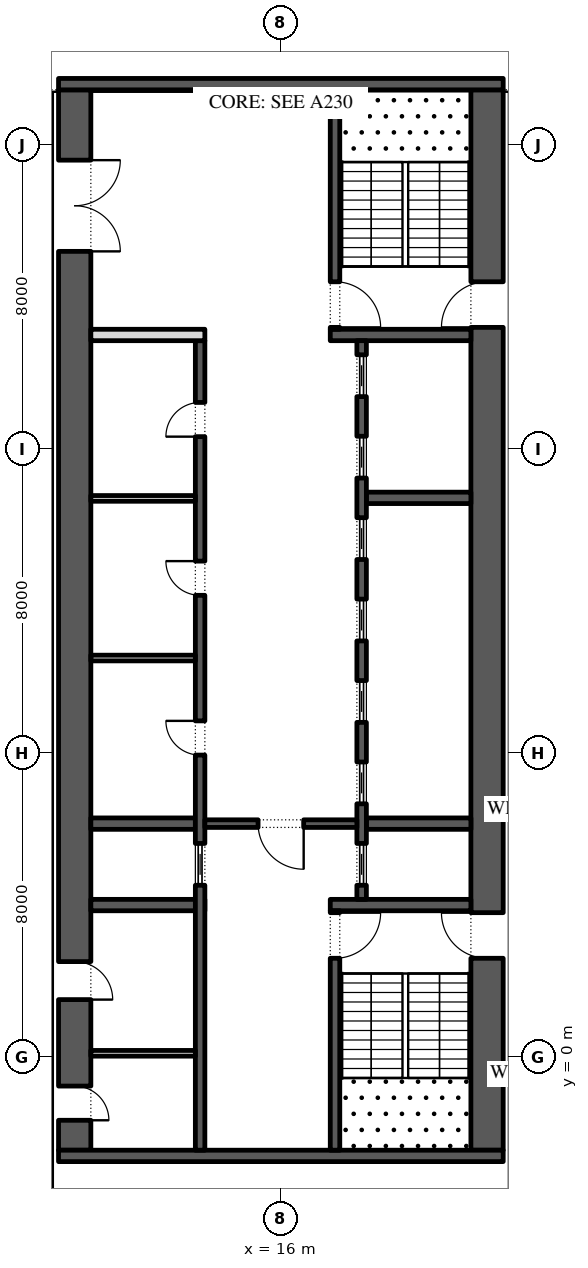
"""IFC4 building model, lengths in metres.
Left out: names, types, materials, properties, quantities, classifications, styles, units other than length and angle.
Written with IfcOpenShell. Run it as: python <this file> out.ifc"""

import sys

from ifc_helpers import new_model, si_unit, direction, frame, frame_2d, origin, place, context, subcontext, project, spatial, rectangle, extrude, element, fill, save


model = new_model("IFC4")
c1 = context("Model", 3, precision=1e-05, world=origin(), true_north=direction((0.0, 1.0)))
c2 = subcontext(c1, "Body", "Model", "MODEL_VIEW")
j1 = project(units=[si_unit("LENGTHUNIT", "METRE"), si_unit("PLANEANGLEUNIT", "RADIAN")], contexts=[c1])
p1 = place(None, origin())
s1 = spatial("IfcSite", under=j1, at=p1, CompositionType="ELEMENT")
p2 = place(p1, origin())
s2 = spatial("IfcBuilding", under=s1, at=p2, CompositionType="ELEMENT")
p3 = place(p2, frame((0.0, 0.0, 126.6)))
s3 = spatial("IfcBuildingStorey", under=s2, at=p3, CompositionType="ELEMENT", Elevation=126.6)
p4 = place(p3, frame((21.425, -2.45, 0.0), z_axis=(0.0, 0.0, 1.0), x_axis=(0.0, 1.0, 0.0)))
e1 = element("IfcWall", 1, at=p4, inside=s3, PredefinedType="SHEAR", context=c2, shape_type="SweptSolid", body=[
    extrude(rectangle(XDim=27.9, YDim=0.85, at=frame_2d((13.95, 0.0))), origin(), (0.0, 0.0, 1.0), 4.0),
])
p5 = place(p4, frame((5.05, 0.0, 0.0)))
e2 = element("IfcOpeningElement", 2, at=p5, cuts=e1, PredefinedType="OPENING", context=c2, shape_type="SweptSolid", body=[
    extrude(rectangle(XDim=1.2, YDim=2.1, at=frame_2d((0.6, 1.05))), frame((0.0, 0.435, 0.0), z_axis=(0.0, -1.0, 0.0), x_axis=(1.0, 0.0, 0.0)), (0.0, 0.0, 1.0), 0.87),
])
p6 = place(p4, frame((21.65, 0.0, 0.0)))
e3 = element("IfcOpeningElement", 3, at=p6, cuts=e1, PredefinedType="OPENING", context=c2, shape_type="SweptSolid", body=[
    extrude(rectangle(XDim=1.2, YDim=2.1, at=frame_2d((0.6, 1.05))), frame((0.0, 0.435, 0.0), z_axis=(0.0, -1.0, 0.0), x_axis=(1.0, 0.0, 0.0)), (0.0, 0.0, 1.0), 0.87),
])
p7 = place(p3, frame((10.575, -2.45, 0.0), z_axis=(0.0, 0.0, 1.0), x_axis=(0.0, 1.0, 0.0)))
e4 = element("IfcWall", 4, at=p7, inside=s3, PredefinedType="SHEAR", context=c2, shape_type="SweptSolid", body=[
    extrude(rectangle(XDim=27.9, YDim=0.85, at=frame_2d((13.95, 0.0))), origin(), (0.0, 0.0, 1.0), 4.0),
])
p8 = place(p7, frame((23.65, 0.0, 0.0)))
e5 = element("IfcOpeningElement", 5, at=p8, cuts=e4, PredefinedType="OPENING", context=c2, shape_type="SweptSolid", body=[
    extrude(rectangle(XDim=2.4, YDim=2.1, at=frame_2d((1.2, 1.05))), frame((0.0, 0.435, 0.0), z_axis=(0.0, -1.0, 0.0), x_axis=(1.0, 0.0, 0.0)), (0.0, 0.0, 1.0), 0.87),
])
p9 = place(p7, frame((0.788, 0.0, 0.0)))
e6 = element("IfcOpeningElement", 6, at=p9, cuts=e4, PredefinedType="OPENING", context=c2, shape_type="SweptSolid", body=[
    extrude(rectangle(XDim=0.9, YDim=2.1, at=frame_2d((0.45, 1.05))), frame((0.0, 0.435, 0.0), z_axis=(0.0, -1.0, 0.0), x_axis=(1.0, 0.0, 0.0)), (0.0, 0.0, 1.0), 0.87),
])
p10 = place(p7, frame((3.962, 0.0, 0.0)))
e7 = element("IfcOpeningElement", 7, at=p10, cuts=e4, PredefinedType="OPENING", context=c2, shape_type="SweptSolid", body=[
    extrude(rectangle(XDim=1.0, YDim=2.1, at=frame_2d((0.5, 1.05))), frame((0.0, 0.435, 0.0), z_axis=(0.0, -1.0, 0.0), x_axis=(1.0, 0.0, 0.0)), (0.0, 0.0, 1.0), 0.87),
])
for number, where, z_axis, x_axis in (
    (8, (10.15, -2.6, 0.0), (0.0, 0.0, 1.0), (1.0, 0.0, 0.0)),
    (9, (10.15, 25.6, 0.0), (0.0, 0.0, 1.0), (1.0, 0.0, 0.0)),
):
    element("IfcWall", number, at=place(p3, frame(where, z_axis=z_axis, x_axis=x_axis)), inside=s3, PredefinedType="SHEAR", context=c2, shape_type="SweptSolid", body=[
        extrude(rectangle(XDim=11.7, YDim=0.3, at=frame_2d((5.85, 0.0))), origin(), (0.0, 0.0, 1.0), 4.0),
    ])
p11 = place(p3, frame((17.3, 4.0, 0.0), z_axis=(0.0, 0.0, 1.0), x_axis=(1.0, 0.0, 0.0)))
e10 = element("IfcWall", 10, at=p11, inside=s3, PredefinedType="SHEAR", context=c2, shape_type="SweptSolid", body=[
    extrude(rectangle(XDim=3.7, YDim=0.3, at=frame_2d((1.85, 0.0))), origin(), (0.0, 0.0, 1.0), 4.0),
])
p12 = place(p3, frame((17.425, -2.45, 0.0), z_axis=(0.0, 0.0, 1.0), x_axis=(0.0, 1.0, 0.0)))
e11 = element("IfcWall", 11, at=p12, inside=s3, PredefinedType="SHEAR", context=c2, shape_type="SweptSolid", body=[
    extrude(rectangle(XDim=6.3, YDim=0.25, at=frame_2d((3.15, 0.0))), origin(), (0.0, 0.0, 1.0), 4.0),
])
p13 = place(p12, frame((5.05, 0.0, 0.0)))
e12 = element("IfcOpeningElement", 12, at=p13, cuts=e11, PredefinedType="OPENING", context=c2, shape_type="SweptSolid", body=[
    extrude(rectangle(XDim=1.2, YDim=2.1, at=frame_2d((0.6, 1.05))), frame((0.0, 0.135, 0.0), z_axis=(0.0, -1.0, 0.0), x_axis=(1.0, 0.0, 0.0)), (0.0, 0.0, 1.0), 0.27),
])
p14 = place(p3, frame((17.3, 19.0, 0.0), z_axis=(0.0, 0.0, 1.0), x_axis=(1.0, 0.0, 0.0)))
e13 = element("IfcWall", 13, at=p14, inside=s3, PredefinedType="SHEAR", context=c2, shape_type="SweptSolid", body=[
    extrude(rectangle(XDim=3.7, YDim=0.3, at=frame_2d((1.85, 0.0))), origin(), (0.0, 0.0, 1.0), 4.0),
])
p15 = place(p3, frame((17.425, 19.15, 0.0), z_axis=(0.0, 0.0, 1.0), x_axis=(0.0, 1.0, 0.0)))
e14 = element("IfcWall", 14, at=p15, inside=s3, PredefinedType="SHEAR", context=c2, shape_type="SweptSolid", body=[
    extrude(rectangle(XDim=6.3, YDim=0.25, at=frame_2d((3.15, 0.0))), origin(), (0.0, 0.0, 1.0), 4.0),
])
p16 = place(p15, frame((0.05, 0.0, 0.0)))
e15 = element("IfcOpeningElement", 15, at=p16, cuts=e14, PredefinedType="OPENING", context=c2, shape_type="SweptSolid", body=[
    extrude(rectangle(XDim=1.2, YDim=2.1, at=frame_2d((0.6, 1.05))), frame((0.0, 0.135, 0.0), z_axis=(0.0, -1.0, 0.0), x_axis=(1.0, 0.0, 0.0)), (0.0, 0.0, 1.0), 0.27),
])
for number, where, z_axis, x_axis in (
    (16, (18.25, 6.143, 0.0), (0.0, 0.0, 1.0), (1.0, 0.0, 0.0)),
    (17, (18.25, 14.714, 0.0), (0.0, 0.0, 1.0), (1.0, 0.0, 0.0)),
):
    element("IfcWall", number, at=place(p3, frame(where, z_axis=z_axis, x_axis=x_axis)), inside=s3, PredefinedType="SHEAR", context=c2, shape_type="SweptSolid", body=[
        extrude(rectangle(XDim=2.75, YDim=0.3, at=frame_2d((1.375, 0.0))), origin(), (0.0, 0.0, 1.0), 4.0),
    ])
p17 = place(p3, frame((18.125, 4.15, 0.0), z_axis=(0.0, 0.0, 1.0), x_axis=(0.0, 1.0, 0.0)))
e18 = element("IfcWall", 18, at=p17, inside=s3, PredefinedType="SHEAR", context=c2, shape_type="SweptSolid", body=[
    extrude(rectangle(XDim=14.7, YDim=0.25, at=frame_2d((7.35, 0.0))), origin(), (0.0, 0.0, 1.0), 4.0),
])
p18 = place(p17, frame((0.371, 0.0, 0.0)))
e19 = element("IfcOpeningElement", 19, at=p18, cuts=e18, PredefinedType="OPENING", context=c2, shape_type="SweptSolid", body=[
    extrude(rectangle(XDim=1.1, YDim=2.1, at=frame_2d((0.55, 1.05))), frame((0.0, 0.135, 0.0), z_axis=(0.0, -1.0, 0.0), x_axis=(1.0, 0.0, 0.0)), (0.0, 0.0, 1.0), 0.27),
])
p19 = place(p17, frame((2.514, 0.0, 0.0)))
e20 = element("IfcOpeningElement", 20, at=p19, cuts=e18, PredefinedType="OPENING", context=c2, shape_type="SweptSolid", body=[
    extrude(rectangle(XDim=1.1, YDim=2.1, at=frame_2d((0.55, 1.05))), frame((0.0, 0.135, 0.0), z_axis=(0.0, -1.0, 0.0), x_axis=(1.0, 0.0, 0.0)), (0.0, 0.0, 1.0), 0.27),
])
p20 = place(p17, frame((4.657, 0.0, 0.0)))
e21 = element("IfcOpeningElement", 21, at=p20, cuts=e18, PredefinedType="OPENING", context=c2, shape_type="SweptSolid", body=[
    extrude(rectangle(XDim=1.1, YDim=2.1, at=frame_2d((0.55, 1.05))), frame((0.0, 0.135, 0.0), z_axis=(0.0, -1.0, 0.0), x_axis=(1.0, 0.0, 0.0)), (0.0, 0.0, 1.0), 0.27),
])
p21 = place(p17, frame((6.8, 0.0, 0.0)))
e22 = element("IfcOpeningElement", 22, at=p21, cuts=e18, PredefinedType="OPENING", context=c2, shape_type="SweptSolid", body=[
    extrude(rectangle(XDim=1.1, YDim=2.1, at=frame_2d((0.55, 1.05))), frame((0.0, 0.135, 0.0), z_axis=(0.0, -1.0, 0.0), x_axis=(1.0, 0.0, 0.0)), (0.0, 0.0, 1.0), 0.27),
])
p22 = place(p17, frame((8.943, 0.0, 0.0)))
e23 = element("IfcOpeningElement", 23, at=p22, cuts=e18, PredefinedType="OPENING", context=c2, shape_type="SweptSolid", body=[
    extrude(rectangle(XDim=1.1, YDim=2.1, at=frame_2d((0.55, 1.05))), frame((0.0, 0.135, 0.0), z_axis=(0.0, -1.0, 0.0), x_axis=(1.0, 0.0, 0.0)), (0.0, 0.0, 1.0), 0.27),
])
p23 = place(p17, frame((11.086, 0.0, 0.0)))
e24 = element("IfcOpeningElement", 24, at=p23, cuts=e18, PredefinedType="OPENING", context=c2, shape_type="SweptSolid", body=[
    extrude(rectangle(XDim=1.1, YDim=2.1, at=frame_2d((0.55, 1.05))), frame((0.0, 0.135, 0.0), z_axis=(0.0, -1.0, 0.0), x_axis=(1.0, 0.0, 0.0)), (0.0, 0.0, 1.0), 0.27),
])
p24 = place(p17, frame((13.229, 0.0, 0.0)))
e25 = element("IfcOpeningElement", 25, at=p24, cuts=e18, PredefinedType="OPENING", context=c2, shape_type="SweptSolid", body=[
    extrude(rectangle(XDim=1.1, YDim=2.1, at=frame_2d((0.55, 1.05))), frame((0.0, 0.135, 0.0), z_axis=(0.0, -1.0, 0.0), x_axis=(1.0, 0.0, 0.0)), (0.0, 0.0, 1.0), 0.27),
])
p25 = place(p3, frame((11.0, 4.0, 0.0), z_axis=(0.0, 0.0, 1.0), x_axis=(1.0, 0.0, 0.0)))
e26 = element("IfcWall", 26, at=p25, inside=s3, PredefinedType="SHEAR", context=c2, shape_type="SweptSolid", body=[
    extrude(rectangle(XDim=3.0, YDim=0.3, at=frame_2d((1.5, 0.0))), origin(), (0.0, 0.0, 1.0), 4.0),
])
p26 = place(p3, frame((11.0, 6.143, 0.0), z_axis=(0.0, 0.0, 1.0), x_axis=(1.0, 0.0, 0.0)))
e27 = element("IfcWall", 27, at=p26, inside=s3, PredefinedType="SHEAR", context=c2, shape_type="SweptSolid", body=[
    extrude(rectangle(XDim=2.75, YDim=0.3, at=frame_2d((1.375, 0.0))), origin(), (0.0, 0.0, 1.0), 4.0),
])
p27 = place(p3, frame((13.875, -2.45, 0.0), z_axis=(0.0, 0.0, 1.0), x_axis=(0.0, 1.0, 0.0)))
e28 = element("IfcWall", 28, at=p27, inside=s3, PredefinedType="SHEAR", context=c2, shape_type="SweptSolid", body=[
    extrude(rectangle(XDim=21.3, YDim=0.25, at=frame_2d((10.65, 0.0))), origin(), (0.0, 0.0, 1.0), 4.0),
])
p28 = place(p27, frame((10.396, 0.0, 0.0)))
e29 = element("IfcOpeningElement", 29, at=p28, cuts=e28, PredefinedType="OPENING", context=c2, shape_type="SweptSolid", body=[
    extrude(rectangle(XDim=0.9, YDim=2.1, at=frame_2d((0.45, 1.05))), frame((0.0, 0.135, 0.0), z_axis=(0.0, -1.0, 0.0), x_axis=(1.0, 0.0, 0.0)), (0.0, 0.0, 1.0), 0.27),
])
p29 = place(p27, frame((14.6, 0.0, 0.0)))
e30 = element("IfcOpeningElement", 30, at=p29, cuts=e28, PredefinedType="OPENING", context=c2, shape_type="SweptSolid", body=[
    extrude(rectangle(XDim=0.9, YDim=2.1, at=frame_2d((0.45, 1.05))), frame((0.0, 0.135, 0.0), z_axis=(0.0, -1.0, 0.0), x_axis=(1.0, 0.0, 0.0)), (0.0, 0.0, 1.0), 0.27),
])
p30 = place(p27, frame((18.775, 0.0, 0.0)))
e31 = element("IfcOpeningElement", 31, at=p30, cuts=e28, PredefinedType="OPENING", context=c2, shape_type="SweptSolid", body=[
    extrude(rectangle(XDim=0.9, YDim=2.1, at=frame_2d((0.45, 1.05))), frame((0.0, 0.135, 0.0), z_axis=(0.0, -1.0, 0.0), x_axis=(1.0, 0.0, 0.0)), (0.0, 0.0, 1.0), 0.27),
])
p31 = place(p27, frame((6.971, 0.0, 0.0)))
e32 = element("IfcOpeningElement", 32, at=p31, cuts=e28, PredefinedType="OPENING", context=c2, shape_type="SweptSolid", body=[
    extrude(rectangle(XDim=1.1, YDim=2.1, at=frame_2d((0.55, 1.05))), frame((0.0, 0.135, 0.0), z_axis=(0.0, -1.0, 0.0), x_axis=(1.0, 0.0, 0.0)), (0.0, 0.0, 1.0), 0.27),
])
p32 = place(p3, frame((11.0, 19.0, 0.0), z_axis=(0.0, 0.0, 1.0), x_axis=(1.0, 0.0, 0.0)))
e33 = element("IfcWall", 33, at=p32, inside=s3, PredefinedType="PARTITIONING", context=c2, shape_type="SweptSolid", body=[
    extrude(rectangle(XDim=3.0, YDim=0.3, at=frame_2d((1.5, 0.0))), origin(), (0.0, 0.0, 1.0), 4.0),
])
for number, where, z_axis, x_axis in (
    (34, (11.0, 10.5, 0.0), (0.0, 0.0, 1.0), (1.0, 0.0, 0.0)),
    (35, (11.0, 14.7, 0.0), (0.0, 0.0, 1.0), (1.0, 0.0, 0.0)),
):
    element("IfcWall", number, at=place(p3, frame(where, z_axis=z_axis, x_axis=x_axis)), inside=s3, PredefinedType="PARTITIONING", context=c2, shape_type="SweptSolid", body=[
        extrude(rectangle(XDim=2.75, YDim=0.15, at=frame_2d((1.375, 0.0))), origin(), (0.0, 0.0, 1.0), 4.0),
    ])
p33 = place(p3, frame((14.0, 6.143, 0.0), z_axis=(0.0, 0.0, 1.0), x_axis=(1.0, 0.0, 0.0)))
e36 = element("IfcWall", 36, at=p33, inside=s3, PredefinedType="SHEAR", context=c2, shape_type="SweptSolid", body=[
    extrude(rectangle(XDim=4.0, YDim=0.2, at=frame_2d((2.0, 0.0))), origin(), (0.0, 0.0, 1.0), 4.0),
])
p34 = place(p33, frame((1.4, 0.0, 0.0)))
e37 = element("IfcOpeningElement", 37, at=p34, cuts=e36, PredefinedType="OPENING", context=c2, shape_type="SweptSolid", body=[
    extrude(rectangle(XDim=1.2, YDim=2.1, at=frame_2d((0.6, 1.05))), frame((0.0, 0.11, 0.0), z_axis=(0.0, -1.0, 0.0), x_axis=(1.0, 0.0, 0.0)), (0.0, 0.0, 1.0), 0.22),
])
p35 = place(p3, frame((11.0, 0.1, 0.0), z_axis=(0.0, 0.0, 1.0), x_axis=(1.0, 0.0, 0.0)))
e38 = element("IfcWall", 38, at=p35, inside=s3, PredefinedType="PARTITIONING", context=c2, shape_type="SweptSolid", body=[
    extrude(rectangle(XDim=2.75, YDim=0.15, at=frame_2d((1.375, 0.0))), origin(), (0.0, 0.0, 1.0), 4.0),
])
p36 = place(p18, origin())
e39 = element("IfcDoor", 39, at=p36, inside=s3, OperationType="SLIDING_TO_LEFT", PredefinedType="DOOR", context=c2, shape_type="SweptSolid", body=[
    extrude(rectangle(XDim=1.1, YDim=2.1, at=frame_2d((0.55, 1.05))), frame((0.0, 0.025, 0.0), z_axis=(0.0, -1.0, 0.0), x_axis=(1.0, 0.0, 0.0)), (0.0, 0.0, 1.0), 0.05),
])
fill(e19, e39)
p37 = place(p19, origin())
e40 = element("IfcDoor", 40, at=p37, inside=s3, OperationType="SLIDING_TO_LEFT", PredefinedType="DOOR", context=c2, shape_type="SweptSolid", body=[
    extrude(rectangle(XDim=1.1, YDim=2.1, at=frame_2d((0.55, 1.05))), frame((0.0, 0.025, 0.0), z_axis=(0.0, -1.0, 0.0), x_axis=(1.0, 0.0, 0.0)), (0.0, 0.0, 1.0), 0.05),
])
fill(e20, e40)
p38 = place(p20, origin())
e41 = element("IfcDoor", 41, at=p38, inside=s3, OperationType="SLIDING_TO_LEFT", PredefinedType="DOOR", context=c2, shape_type="SweptSolid", body=[
    extrude(rectangle(XDim=1.1, YDim=2.1, at=frame_2d((0.55, 1.05))), frame((0.0, 0.025, 0.0), z_axis=(0.0, -1.0, 0.0), x_axis=(1.0, 0.0, 0.0)), (0.0, 0.0, 1.0), 0.05),
])
fill(e21, e41)
p39 = place(p21, origin())
e42 = element("IfcDoor", 42, at=p39, inside=s3, OperationType="SLIDING_TO_LEFT", PredefinedType="DOOR", context=c2, shape_type="SweptSolid", body=[
    extrude(rectangle(XDim=1.1, YDim=2.1, at=frame_2d((0.55, 1.05))), frame((0.0, 0.025, 0.0), z_axis=(0.0, -1.0, 0.0), x_axis=(1.0, 0.0, 0.0)), (0.0, 0.0, 1.0), 0.05),
])
fill(e22, e42)
p40 = place(p22, origin())
e43 = element("IfcDoor", 43, at=p40, inside=s3, OperationType="SLIDING_TO_LEFT", PredefinedType="DOOR", context=c2, shape_type="SweptSolid", body=[
    extrude(rectangle(XDim=1.1, YDim=2.1, at=frame_2d((0.55, 1.05))), frame((0.0, 0.025, 0.0), z_axis=(0.0, -1.0, 0.0), x_axis=(1.0, 0.0, 0.0)), (0.0, 0.0, 1.0), 0.05),
])
fill(e23, e43)
p41 = place(p23, origin())
e44 = element("IfcDoor", 44, at=p41, inside=s3, OperationType="SLIDING_TO_LEFT", PredefinedType="DOOR", context=c2, shape_type="SweptSolid", body=[
    extrude(rectangle(XDim=1.1, YDim=2.1, at=frame_2d((0.55, 1.05))), frame((0.0, 0.025, 0.0), z_axis=(0.0, -1.0, 0.0), x_axis=(1.0, 0.0, 0.0)), (0.0, 0.0, 1.0), 0.05),
])
fill(e24, e44)
p42 = place(p24, origin())
e45 = element("IfcDoor", 45, at=p42, inside=s3, OperationType="SLIDING_TO_LEFT", PredefinedType="DOOR", context=c2, shape_type="SweptSolid", body=[
    extrude(rectangle(XDim=1.1, YDim=2.1, at=frame_2d((0.55, 1.05))), frame((0.0, 0.025, 0.0), z_axis=(0.0, -1.0, 0.0), x_axis=(1.0, 0.0, 0.0)), (0.0, 0.0, 1.0), 0.05),
])
fill(e25, e45)
p43 = place(p28, origin())
e46 = element("IfcDoor", 46, at=p43, inside=s3, OperationType="SINGLE_SWING_LEFT", PredefinedType="DOOR", context=c2, shape_type="SweptSolid", body=[
    extrude(rectangle(XDim=0.9, YDim=2.1, at=frame_2d((0.45, 1.05))), frame((0.0, 0.125, 0.0), z_axis=(0.0, -1.0, 0.0), x_axis=(1.0, 0.0, 0.0)), (0.0, 0.0, 1.0), 0.05),
])
fill(e29, e46)
p44 = place(p29, origin())
e47 = element("IfcDoor", 47, at=p44, inside=s3, OperationType="SINGLE_SWING_LEFT", PredefinedType="DOOR", context=c2, shape_type="SweptSolid", body=[
    extrude(rectangle(XDim=0.9, YDim=2.1, at=frame_2d((0.45, 1.05))), frame((0.0, 0.125, 0.0), z_axis=(0.0, -1.0, 0.0), x_axis=(1.0, 0.0, 0.0)), (0.0, 0.0, 1.0), 0.05),
])
fill(e30, e47)
p45 = place(p30, origin())
e48 = element("IfcDoor", 48, at=p45, inside=s3, OperationType="SINGLE_SWING_RIGHT", PredefinedType="DOOR", context=c2, shape_type="SweptSolid", body=[
    extrude(rectangle(XDim=0.9, YDim=2.1, at=frame_2d((0.45, 1.05))), frame((0.0, 0.125, 0.0), z_axis=(0.0, -1.0, 0.0), x_axis=(1.0, 0.0, 0.0)), (0.0, 0.0, 1.0), 0.05),
])
fill(e31, e48)
p46 = place(p31, origin())
e49 = element("IfcDoor", 49, at=p46, inside=s3, OperationType="SLIDING_TO_LEFT", PredefinedType="DOOR", context=c2, shape_type="SweptSolid", body=[
    extrude(rectangle(XDim=1.1, YDim=2.1, at=frame_2d((0.55, 1.05))), frame((0.0, 0.025, 0.0), z_axis=(0.0, -1.0, 0.0), x_axis=(1.0, 0.0, 0.0)), (0.0, 0.0, 1.0), 0.05),
])
fill(e32, e49)
p47 = place(p34, frame((1.2, 0.0, 0.0), z_axis=(0.0, 0.0, 1.0), x_axis=(-1.0, 0.0, 0.0)))
e50 = element("IfcDoor", 50, at=p47, inside=s3, OperationType="SINGLE_SWING_RIGHT", PredefinedType="DOOR", context=c2, shape_type="SweptSolid", body=[
    extrude(rectangle(XDim=1.2, YDim=2.1, at=frame_2d((0.6, 1.05))), frame((0.0, 0.025, 0.0), z_axis=(0.0, -1.0, 0.0), x_axis=(1.0, 0.0, 0.0)), (0.0, 0.0, 1.0), 0.05),
])
fill(e37, e50)
p48 = place(p8, frame((2.4, 0.0, 0.0), z_axis=(0.0, 0.0, 1.0), x_axis=(-1.0, 0.0, 0.0)))
e51 = element("IfcDoor", 51, at=p48, inside=s3, OperationType="DOUBLE_DOOR_SINGLE_SWING", PredefinedType="DOOR", context=c2, shape_type="SweptSolid", body=[
    extrude(rectangle(XDim=2.4, YDim=2.1, at=frame_2d((1.2, 1.05))), frame((0.0, 0.025, 0.0), z_axis=(0.0, -1.0, 0.0), x_axis=(1.0, 0.0, 0.0)), (0.0, 0.0, 1.0), 0.05),
])
fill(e5, e51)
p49 = place(p13, frame((1.2, 0.0, 0.0), z_axis=(0.0, 0.0, 1.0), x_axis=(-1.0, 0.0, 0.0)))
e52 = element("IfcDoor", 52, at=p49, inside=s3, OperationType="SINGLE_SWING_RIGHT", PredefinedType="DOOR", context=c2, shape_type="SweptSolid", body=[
    extrude(rectangle(XDim=1.2, YDim=2.1, at=frame_2d((0.6, 1.05))), frame((0.0, 0.025, 0.0), z_axis=(0.0, -1.0, 0.0), x_axis=(1.0, 0.0, 0.0)), (0.0, 0.0, 1.0), 0.05),
])
fill(e12, e52)
p50 = place(p5, origin())
e53 = element("IfcDoor", 53, at=p50, inside=s3, OperationType="SINGLE_SWING_LEFT", PredefinedType="DOOR", context=c2, shape_type="SweptSolid", body=[
    extrude(rectangle(XDim=1.2, YDim=2.1, at=frame_2d((0.6, 1.05))), frame((0.0, 0.025, 0.0), z_axis=(0.0, -1.0, 0.0), x_axis=(1.0, 0.0, 0.0)), (0.0, 0.0, 1.0), 0.05),
])
fill(e2, e53)
p51 = place(p16, frame((1.2, 0.0, 0.0), z_axis=(0.0, 0.0, 1.0), x_axis=(-1.0, 0.0, 0.0)))
e54 = element("IfcDoor", 54, at=p51, inside=s3, OperationType="SINGLE_SWING_LEFT", PredefinedType="DOOR", context=c2, shape_type="SweptSolid", body=[
    extrude(rectangle(XDim=1.2, YDim=2.1, at=frame_2d((0.6, 1.05))), frame((0.0, 0.025, 0.0), z_axis=(0.0, -1.0, 0.0), x_axis=(1.0, 0.0, 0.0)), (0.0, 0.0, 1.0), 0.05),
])
fill(e15, e54)
p52 = place(p6, origin())
e55 = element("IfcDoor", 55, at=p52, inside=s3, OperationType="SINGLE_SWING_RIGHT", PredefinedType="DOOR", context=c2, shape_type="SweptSolid", body=[
    extrude(rectangle(XDim=1.2, YDim=2.1, at=frame_2d((0.6, 1.05))), frame((0.0, 0.025, 0.0), z_axis=(0.0, -1.0, 0.0), x_axis=(1.0, 0.0, 0.0)), (0.0, 0.0, 1.0), 0.05),
])
fill(e3, e55)
p53 = place(p9, frame((0.9, -0.8, 0.0), z_axis=(0.0, 0.0, 1.0), x_axis=(-1.0, 0.0, 0.0)))
e56 = element("IfcDoor", 56, at=p53, inside=s3, OperationType="SINGLE_SWING_LEFT", PredefinedType="DOOR", context=c2, shape_type="SweptSolid", body=[
    extrude(rectangle(XDim=0.9, YDim=2.1, at=frame_2d((0.45, 1.05))), frame((0.0, -0.375, 0.0), z_axis=(0.0, -1.0, 0.0), x_axis=(1.0, 0.0, 0.0)), (0.0, 0.0, 1.0), 0.05),
])
fill(e6, e56)
p54 = place(p10, frame((1.0, -0.8, 0.0), z_axis=(0.0, 0.0, 1.0), x_axis=(-1.0, 0.0, 0.0)))
e57 = element("IfcDoor", 57, at=p54, inside=s3, OperationType="SINGLE_SWING_LEFT", PredefinedType="DOOR", context=c2, shape_type="SweptSolid", body=[
    extrude(rectangle(XDim=1.0, YDim=2.1, at=frame_2d((0.5, 1.05))), frame((0.0, -0.375, 0.0), z_axis=(0.0, -1.0, 0.0), x_axis=(1.0, 0.0, 0.0)), (0.0, 0.0, 1.0), 0.05),
])
fill(e7, e57)
save(model, sys.argv[1])
